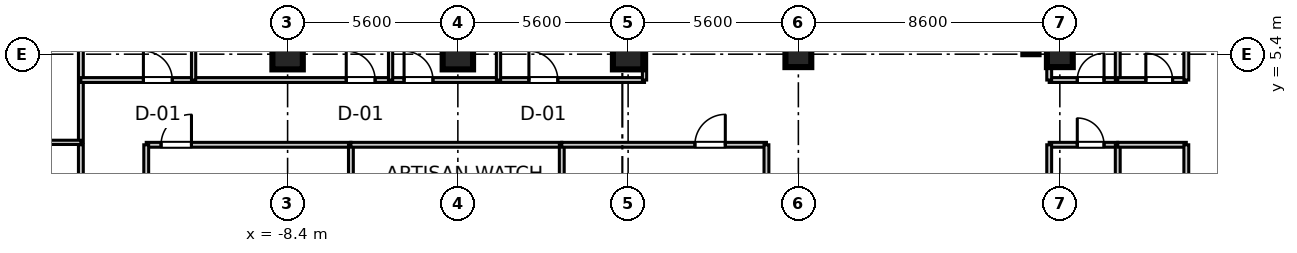
"""IFC4 building model, lengths in metres.
Left out: names, types, materials, properties, quantities, classifications, styles, units other than length and angle.
Written with IfcOpenShell. Run it as: python <this file> out.ifc"""

import sys

from ifc_helpers import new_model, si_unit, direction, frame, frame_2d, origin, origin_2d, place, context, subcontext, project, spatial, rectangle, extrude, source, transform, mapped, element, fill, save


model = new_model("IFC4")
c1 = context("Model", 3, precision=1e-05, world=origin(), true_north=direction((0.0, 1.0)))
c2 = subcontext(c1, "Body", "Model", "MODEL_VIEW")
j1 = project(units=[si_unit("LENGTHUNIT", "METRE"), si_unit("PLANEANGLEUNIT", "RADIAN")], contexts=[c1])
p1 = place(None, origin())
s1 = spatial("IfcSite", under=j1, at=p1, CompositionType="ELEMENT")
p2 = place(p1, origin())
s2 = spatial("IfcBuilding", under=s1, at=p2, CompositionType="ELEMENT")
p3 = place(p2, frame((0.0, 0.0, 204.9)))
s3 = spatial("IfcBuildingStorey", under=s2, at=p3, CompositionType="ELEMENT", Elevation=204.9)
m1 = source(origin(), c2, "Body", "SweptSolid", [
    extrude(rectangle(XDim=1.0, YDim=1.0, at=origin_2d()), origin(), (0.0, 0.0, 1.0), 3.655),
])
for number, where, z_axis, x_axis in (
    (1, (-8.4, 5.4, 0.0), (0.0, 0.0, 1.0), (1.0, 0.0, 0.0)),
    (2, (-2.8, 5.4, 0.0), (0.0, 0.0, 1.0), (1.0, 0.0, 0.0)),
    (3, (2.8, 5.4, 0.0), (0.0, 0.0, 1.0), (1.0, 0.0, 0.0)),
):
    element("IfcColumn", number, at=place(p3, frame(where, z_axis=z_axis, x_axis=x_axis)), inside=s3, PredefinedType="COLUMN", context=c2, shape_type="MappedRepresentation", body=[
        mapped(m1, transform((0.0, 0.0, 0.0), scale=1.0)),
    ])
m2 = source(origin(), c2, "Body", "SweptSolid", [
    extrude(rectangle(XDim=0.85, YDim=0.85, at=origin_2d()), origin(), (0.0, 0.0, 1.0), 3.655),
])
for number, where, z_axis, x_axis in (
    (4, (8.4, 5.4, 0.0), (0.0, 0.0, 1.0), (1.0, 0.0, 0.0)),
    (5, (17.0, 5.4, 0.0), (0.0, 0.0, 1.0), (1.0, 0.0, 0.0)),
):
    element("IfcColumn", number, at=place(p3, frame(where, z_axis=z_axis, x_axis=x_axis)), inside=s3, PredefinedType="PILASTER", context=c2, shape_type="MappedRepresentation", body=[
        mapped(m2, transform((0.0, 0.0, 0.0), scale=1.0)),
    ])
m3 = source(origin(), c2, "Body", "SweptSolid", [
    extrude(rectangle(XDim=11.6, YDim=0.5, at=frame_2d((5.8, 0.0))), origin(), (0.0, 0.0, 1.0), 3.41),
])
p4 = place(p3, frame((16.05, 5.4, 0.0), z_axis=(0.0, 0.0, 1.0), x_axis=(0.0, 1.0, 0.0)))
e6 = element("IfcWall", 6, at=p4, inside=s3, PredefinedType="SHEAR", context=c2, shape_type="MappedRepresentation", body=[
    mapped(m3, transform((0.0, 0.0, 0.0), scale=1.0)),
])
m4 = source(origin(), c2, "Body", "SweptSolid", [
    extrude(rectangle(XDim=2.255, YDim=0.16, at=frame_2d((1.127, 0.0))), origin(), (0.0, 0.0, 1.0), 2.75),
])
p5 = place(p3, frame((16.65, 4.55, 0.0), z_axis=(0.0, 0.0, 1.0), x_axis=(1.0, 0.0, 0.0)))
e7 = element("IfcWall", 7, at=p5, inside=s3, PredefinedType="PARTITIONING", context=c2, shape_type="MappedRepresentation", body=[
    mapped(m4, transform((0.0, 0.0, 0.0), scale=1.0)),
])
p6 = place(p5, frame((0.924, 0.0, 0.0)))
e8 = element("IfcOpeningElement", 8, at=p6, cuts=e7, PredefinedType="OPENING", context=c2, shape_type="SweptSolid", body=[
    extrude(rectangle(XDim=0.88, YDim=2.1, at=frame_2d((0.44, 1.05))), frame((0.0, 0.09, 0.0), z_axis=(0.0, -1.0, 0.0), x_axis=(1.0, 0.0, 0.0)), (0.0, 0.0, 1.0), 0.18),
])
m5 = source(origin(), c2, "Body", "SweptSolid", [
    extrude(rectangle(XDim=19.35, YDim=0.16, at=frame_2d((9.675, 0.0))), origin(), (0.0, 0.0, 1.0), 2.75),
])
for number, where, z_axis, x_axis in (
    (9, (16.65, 4.55, 0.0), (0.0, 0.0, 1.0), (0.0, 1.0, 0.0)),
    (10, (18.905, 4.55, 0.0), (0.0, 0.0, 1.0), (0.0, 1.0, 0.0)),
):
    element("IfcWall", number, at=place(p3, frame(where, z_axis=z_axis, x_axis=x_axis)), inside=s3, PredefinedType="PARTITIONING", context=c2, shape_type="MappedRepresentation", body=[
        mapped(m5, transform((0.0, 0.0, 0.0), scale=1.0)),
    ])
m6 = source(origin(), c2, "Body", "SweptSolid", [
    extrude(rectangle(XDim=2.255, YDim=0.16, at=frame_2d((1.127, 0.0))), origin(), (0.0, 0.0, 1.0), 2.75),
])
p7 = place(p3, frame((18.905, 4.55, 0.0), z_axis=(0.0, 0.0, 1.0), x_axis=(1.0, 0.0, 0.0)))
e11 = element("IfcWall", 11, at=p7, inside=s3, PredefinedType="PARTITIONING", context=c2, shape_type="MappedRepresentation", body=[
    mapped(m6, transform((0.0, 0.0, 0.0), scale=1.0)),
])
p8 = place(p7, frame((0.924, 0.0, 0.0)))
e12 = element("IfcOpeningElement", 12, at=p8, cuts=e11, PredefinedType="OPENING", context=c2, shape_type="SweptSolid", body=[
    extrude(rectangle(XDim=0.88, YDim=2.1, at=frame_2d((0.44, 1.05))), frame((0.0, 0.09, 0.0), z_axis=(0.0, -1.0, 0.0), x_axis=(1.0, 0.0, 0.0)), (0.0, 0.0, 1.0), 0.18),
])
m7 = source(origin(), c2, "Body", "SweptSolid", [
    extrude(rectangle(XDim=17.93, YDim=0.16, at=frame_2d((8.965, 0.0))), origin(), (0.0, 0.0, 1.0), 2.75),
])
p9 = place(p3, frame((21.16, 4.55, 0.0), z_axis=(0.0, 0.0, 1.0), x_axis=(0.0, 1.0, 0.0)))
e13 = element("IfcWall", 13, at=p9, inside=s3, PredefinedType="PARTITIONING", context=c2, shape_type="MappedRepresentation", body=[
    mapped(m7, transform((0.0, 0.0, 0.0), scale=1.0)),
])
m8 = source(origin(), c2, "Body", "SweptSolid", [
    extrude(rectangle(XDim=21.4, YDim=0.16, at=frame_2d((10.7, 0.0))), origin(), (0.0, 0.0, 1.0), 2.75),
])
p10 = place(p3, frame((-15.2, 2.5, 0.0), z_axis=(0.0, 0.0, 1.0), x_axis=(0.0, 1.0, 0.0)))
e14 = element("IfcWall", 14, at=p10, inside=s3, PredefinedType="PARTITIONING", context=c2, shape_type="MappedRepresentation", body=[
    mapped(m8, transform((0.0, 0.0, 0.0), scale=1.0)),
])
p11 = place(p10, frame((8.15, 0.0, 0.0)))
e15 = element("IfcOpeningElement", 15, at=p11, cuts=e14, PredefinedType="OPENING", context=c2, shape_type="SweptSolid", body=[
    extrude(rectangle(XDim=0.95, YDim=2.1, at=frame_2d((0.475, 1.05))), frame((0.0, 0.09, 0.0), z_axis=(0.0, -1.0, 0.0), x_axis=(1.0, 0.0, 0.0)), (0.0, 0.0, 1.0), 0.18),
])
m9 = source(origin(), c2, "Body", "SweptSolid", [
    extrude(rectangle(XDim=5.96, YDim=0.14, at=frame_2d((2.98, 0.0))), origin(), (0.0, 0.0, 1.0), 2.75),
])
p12 = place(p3, frame((-21.16, 2.5, 0.0), z_axis=(0.0, 0.0, 1.0), x_axis=(1.0, 0.0, 0.0)))
e16 = element("IfcWall", 16, at=p12, inside=s3, PredefinedType="PARTITIONING", context=c2, shape_type="MappedRepresentation", body=[
    mapped(m9, transform((0.0, 0.0, 0.0), scale=1.0)),
])
m10 = source(origin(), c2, "Body", "SweptSolid", [
    extrude(rectangle(XDim=18.54, YDim=0.16, at=frame_2d((9.27, 0.0))), origin(), (0.0, 0.0, 1.0), 2.75),
])
p13 = place(p3, frame((-15.2, 4.55, 0.0), z_axis=(0.0, 0.0, 1.0), x_axis=(1.0, 0.0, 0.0)))
e17 = element("IfcWall", 17, at=p13, inside=s3, PredefinedType="PARTITIONING", context=c2, shape_type="MappedRepresentation", body=[
    mapped(m10, transform((0.0, 0.0, 0.0), scale=1.0)),
])
p14 = place(p13, frame((2.057, 0.0, 0.0)))
e18 = element("IfcOpeningElement", 18, at=p14, cuts=e17, PredefinedType="OPENING", context=c2, shape_type="SweptSolid", body=[
    extrude(rectangle(XDim=0.95, YDim=2.1, at=frame_2d((0.475, 1.05))), frame((0.0, 0.09, 0.0), z_axis=(0.0, -1.0, 0.0), x_axis=(1.0, 0.0, 0.0)), (0.0, 0.0, 1.0), 0.18),
])
p15 = place(p13, frame((8.729, 0.0, 0.0)))
e19 = element("IfcOpeningElement", 19, at=p15, cuts=e17, PredefinedType="OPENING", context=c2, shape_type="SweptSolid", body=[
    extrude(rectangle(XDim=0.95, YDim=2.1, at=frame_2d((0.475, 1.05))), frame((0.0, 0.09, 0.0), z_axis=(0.0, -1.0, 0.0), x_axis=(1.0, 0.0, 0.0)), (0.0, 0.0, 1.0), 0.18),
])
p16 = place(p13, frame((10.631, 0.0, 0.0)))
e20 = element("IfcOpeningElement", 20, at=p16, cuts=e17, PredefinedType="OPENING", context=c2, shape_type="SweptSolid", body=[
    extrude(rectangle(XDim=0.95, YDim=2.1, at=frame_2d((0.475, 1.05))), frame((0.0, 0.09, 0.0), z_axis=(0.0, -1.0, 0.0), x_axis=(1.0, 0.0, 0.0)), (0.0, 0.0, 1.0), 0.18),
])
p17 = place(p13, frame((14.737, 0.0, 0.0)))
e21 = element("IfcOpeningElement", 21, at=p17, cuts=e17, PredefinedType="OPENING", context=c2, shape_type="SweptSolid", body=[
    extrude(rectangle(XDim=0.95, YDim=2.1, at=frame_2d((0.475, 1.05))), frame((0.0, 0.09, 0.0), z_axis=(0.0, -1.0, 0.0), x_axis=(1.0, 0.0, 0.0)), (0.0, 0.0, 1.0), 0.18),
])
m11 = source(origin(), c2, "Body", "SweptSolid", [
    extrude(rectangle(XDim=19.35, YDim=0.14, at=frame_2d((9.675, 0.0))), origin(), (0.0, 0.0, 1.0), 2.75),
])
for number, where, z_axis, x_axis in (
    (22, (3.34, 4.55, 0.0), (0.0, 0.0, 1.0), (0.0, 1.0, 0.0)),
    (23, (-11.492, 4.55, 0.0), (0.0, 0.0, 1.0), (0.0, 1.0, 0.0)),
    (24, (-5.013, 4.55, 0.0), (0.0, 0.0, 1.0), (0.0, 1.0, 0.0)),
    (25, (-1.463, 4.55, 0.0), (0.0, 0.0, 1.0), (0.0, 1.0, 0.0)),
):
    element("IfcWall", number, at=place(p3, frame(where, z_axis=z_axis, x_axis=x_axis)), inside=s3, PredefinedType="PARTITIONING", context=c2, shape_type="MappedRepresentation", body=[
        mapped(m11, transform((0.0, 0.0, 0.0), scale=1.0)),
    ])
m12 = source(origin(), c2, "Body", "SweptSolid", [
    extrude(rectangle(XDim=4.84, YDim=0.16, at=frame_2d((2.42, 0.0))), origin(), (0.0, 0.0, 1.0), 2.75),
])
p18 = place(p3, frame((-15.2, -2.42, 0.0), z_axis=(0.0, 0.0, 1.0), x_axis=(0.0, 1.0, 0.0)))
e26 = element("IfcWall", 26, at=p18, inside=s3, PredefinedType="PARTITIONING", context=c2, shape_type="MappedRepresentation", body=[
    mapped(m12, transform((0.0, 0.0, 0.0), scale=1.0)),
])
p19 = place(p18, frame((1.945, 0.0, 0.0)))
e27 = element("IfcOpeningElement", 27, at=p19, cuts=e26, PredefinedType="OPENING", context=c2, shape_type="SweptSolid", body=[
    extrude(rectangle(XDim=0.95, YDim=2.1, at=frame_2d((0.475, 1.05))), frame((0.0, 0.09, 0.0), z_axis=(0.0, -1.0, 0.0), x_axis=(1.0, 0.0, 0.0)), (0.0, 0.0, 1.0), 0.18),
])
m13 = source(origin(), c2, "Body", "SweptSolid", [
    extrude(rectangle(XDim=6.732, YDim=0.16, at=frame_2d((3.366, 0.0))), origin(), (0.0, 0.0, 1.0), 2.75),
])
p20 = place(p3, frame((-13.05, 2.42, 0.0), z_axis=(0.0, 0.0, 1.0), x_axis=(1.0, 0.0, 0.0)))
e28 = element("IfcWall", 28, at=p20, inside=s3, PredefinedType="PARTITIONING", context=c2, shape_type="MappedRepresentation", body=[
    mapped(m13, transform((0.0, 0.0, 0.0), scale=1.0)),
])
p21 = place(p20, frame((0.488, 0.0, 0.0)))
e29 = element("IfcOpeningElement", 29, at=p21, cuts=e28, PredefinedType="OPENING", context=c2, shape_type="SweptSolid", body=[
    extrude(rectangle(XDim=1.0, YDim=2.1, at=frame_2d((0.5, 1.05))), frame((0.0, 0.09, 0.0), z_axis=(0.0, -1.0, 0.0), x_axis=(1.0, 0.0, 0.0)), (0.0, 0.0, 1.0), 0.18),
])
for number, where, z_axis, x_axis in (
    (30, (-13.05, -2.42, 0.0), (0.0, 0.0, 1.0), (0.0, 1.0, 0.0)),
    (31, (-6.318, -2.42, 0.0), (0.0, 0.0, 1.0), (0.0, 1.0, 0.0)),
):
    element("IfcWall", number, at=place(p3, frame(where, z_axis=z_axis, x_axis=x_axis)), inside=s3, PredefinedType="PARTITIONING", context=c2, shape_type="MappedRepresentation", body=[
        mapped(m12, transform((0.0, 0.0, 0.0), scale=1.0)),
    ])
m14 = source(origin(), c2, "Body", "SweptSolid", [
    extrude(rectangle(XDim=6.936, YDim=0.16, at=frame_2d((3.468, 0.0))), origin(), (0.0, 0.0, 1.0), 2.75),
])
p22 = place(p3, frame((-6.318, 2.42, 0.0), z_axis=(0.0, 0.0, 1.0), x_axis=(1.0, 0.0, 0.0)))
e32 = element("IfcWall", 32, at=p22, inside=s3, PredefinedType="PARTITIONING", context=c2, shape_type="MappedRepresentation", body=[
    mapped(m14, transform((0.0, 0.0, 0.0), scale=1.0)),
])
p23 = place(p3, frame((0.618, -2.42, 0.0), z_axis=(0.0, 0.0, 1.0), x_axis=(0.0, 1.0, 0.0)))
e33 = element("IfcWall", 33, at=p23, inside=s3, PredefinedType="PARTITIONING", context=c2, shape_type="MappedRepresentation", body=[
    mapped(m12, transform((0.0, 0.0, 0.0), scale=1.0)),
])
m15 = source(origin(), c2, "Body", "SweptSolid", [
    extrude(rectangle(XDim=6.732, YDim=0.16, at=frame_2d((3.366, 0.0))), origin(), (0.0, 0.0, 1.0), 2.75),
])
p24 = place(p3, frame((0.618, 2.42, 0.0), z_axis=(0.0, 0.0, 1.0), x_axis=(1.0, 0.0, 0.0)))
e34 = element("IfcWall", 34, at=p24, inside=s3, PredefinedType="PARTITIONING", context=c2, shape_type="MappedRepresentation", body=[
    mapped(m15, transform((0.0, 0.0, 0.0), scale=1.0)),
])
p25 = place(p24, frame((4.379, 0.0, 0.0)))
e35 = element("IfcOpeningElement", 35, at=p25, cuts=e34, PredefinedType="OPENING", context=c2, shape_type="SweptSolid", body=[
    extrude(rectangle(XDim=1.0, YDim=2.1, at=frame_2d((0.5, 1.05))), frame((0.0, 0.09, 0.0), z_axis=(0.0, -1.0, 0.0), x_axis=(1.0, 0.0, 0.0)), (0.0, 0.0, 1.0), 0.18),
])
p26 = place(p3, frame((7.35, -2.42, 0.0), z_axis=(0.0, 0.0, 1.0), x_axis=(0.0, 1.0, 0.0)))
e36 = element("IfcWall", 36, at=p26, inside=s3, PredefinedType="PARTITIONING", context=c2, shape_type="MappedRepresentation", body=[
    mapped(m12, transform((0.0, 0.0, 0.0), scale=1.0)),
])
p27 = place(p3, frame((16.65, 2.42, 0.0), z_axis=(0.0, 0.0, 1.0), x_axis=(1.0, 0.0, 0.0)))
e37 = element("IfcWall", 37, at=p27, inside=s3, PredefinedType="PARTITIONING", context=c2, shape_type="MappedRepresentation", body=[
    mapped(m4, transform((0.0, 0.0, 0.0), scale=1.0)),
])
p28 = place(p27, frame((0.924, 0.0, 0.0)))
e38 = element("IfcOpeningElement", 38, at=p28, cuts=e37, PredefinedType="OPENING", context=c2, shape_type="SweptSolid", body=[
    extrude(rectangle(XDim=0.88, YDim=2.1, at=frame_2d((0.44, 1.05))), frame((0.0, 0.09, 0.0), z_axis=(0.0, -1.0, 0.0), x_axis=(1.0, 0.0, 0.0)), (0.0, 0.0, 1.0), 0.18),
])
for number, where, z_axis, x_axis in (
    (39, (16.65, -2.42, 0.0), (0.0, 0.0, 1.0), (0.0, 1.0, 0.0)),
    (40, (18.905, -2.42, 0.0), (0.0, 0.0, 1.0), (0.0, 1.0, 0.0)),
):
    element("IfcWall", number, at=place(p3, frame(where, z_axis=z_axis, x_axis=x_axis)), inside=s3, PredefinedType="PARTITIONING", context=c2, shape_type="MappedRepresentation", body=[
        mapped(m12, transform((0.0, 0.0, 0.0), scale=1.0)),
    ])
p29 = place(p3, frame((18.905, 2.42, 0.0), z_axis=(0.0, 0.0, 1.0), x_axis=(1.0, 0.0, 0.0)))
e41 = element("IfcWall", 41, at=p29, inside=s3, PredefinedType="PARTITIONING", context=c2, shape_type="MappedRepresentation", body=[
    mapped(m6, transform((0.0, 0.0, 0.0), scale=1.0)),
])
p30 = place(p3, frame((21.16, -2.42, 0.0), z_axis=(0.0, 0.0, 1.0), x_axis=(0.0, 1.0, 0.0)))
e42 = element("IfcWall", 42, at=p30, inside=s3, PredefinedType="PARTITIONING", context=c2, shape_type="MappedRepresentation", body=[
    mapped(m12, transform((0.0, 0.0, 0.0), scale=1.0)),
])
m16 = source(origin(), c2, "Body", "SweptSolid", [
    extrude(rectangle(XDim=0.88, YDim=2.1, at=frame_2d((0.44, 1.05))), frame((0.0, 0.025, 0.0), z_axis=(0.0, -1.0, 0.0), x_axis=(1.0, 0.0, 0.0)), (0.0, 0.0, 1.0), 0.05),
])
p31 = place(p6, origin())
e43 = element("IfcDoor", 43, at=p31, inside=s3, OperationType="SINGLE_SWING_RIGHT", PredefinedType="DOOR", context=c2, shape_type="MappedRepresentation", body=[
    mapped(m16, transform((0.0, 0.0, 0.0), scale=1.0)),
])
fill(e8, e43)
p32 = place(p8, origin())
e44 = element("IfcDoor", 44, at=p32, inside=s3, OperationType="SINGLE_SWING_LEFT", PredefinedType="DOOR", context=c2, shape_type="MappedRepresentation", body=[
    mapped(m16, transform((0.0, 0.0, 0.0), scale=1.0)),
])
fill(e12, e44)
m17 = source(origin(), c2, "Body", "SweptSolid", [
    extrude(rectangle(XDim=0.95, YDim=2.1, at=frame_2d((0.475, 1.05))), frame((0.0, 0.025, 0.0), z_axis=(0.0, -1.0, 0.0), x_axis=(1.0, 0.0, 0.0)), (0.0, 0.0, 1.0), 0.05),
])
p33 = place(p14, origin())
e45 = element("IfcDoor", 45, at=p33, inside=s3, OperationType="SINGLE_SWING_LEFT", PredefinedType="DOOR", context=c2, shape_type="MappedRepresentation", body=[
    mapped(m17, transform((0.0, 0.0, 0.0), scale=1.0)),
])
fill(e18, e45)
p34 = place(p15, origin())
e46 = element("IfcDoor", 46, at=p34, inside=s3, OperationType="SINGLE_SWING_LEFT", PredefinedType="DOOR", context=c2, shape_type="MappedRepresentation", body=[
    mapped(m17, transform((0.0, 0.0, 0.0), scale=1.0)),
])
fill(e19, e46)
p35 = place(p16, origin())
e47 = element("IfcDoor", 47, at=p35, inside=s3, OperationType="SINGLE_SWING_LEFT", PredefinedType="DOOR", context=c2, shape_type="MappedRepresentation", body=[
    mapped(m17, transform((0.0, 0.0, 0.0), scale=1.0)),
])
fill(e20, e47)
p36 = place(p17, origin())
e48 = element("IfcDoor", 48, at=p36, inside=s3, OperationType="SINGLE_SWING_LEFT", PredefinedType="DOOR", context=c2, shape_type="MappedRepresentation", body=[
    mapped(m17, transform((0.0, 0.0, 0.0), scale=1.0)),
])
fill(e21, e48)
m18 = source(origin(), c2, "Body", "SweptSolid", [
    extrude(rectangle(XDim=1.0, YDim=2.1, at=frame_2d((0.5, 1.05))), frame((0.0, 0.025, 0.0), z_axis=(0.0, -1.0, 0.0), x_axis=(1.0, 0.0, 0.0)), (0.0, 0.0, 1.0), 0.05),
])
p37 = place(p21, frame((1.0, 0.0, 0.0), z_axis=(0.0, 0.0, 1.0), x_axis=(-1.0, 0.0, 0.0)))
e49 = element("IfcDoor", 49, at=p37, inside=s3, OperationType="SINGLE_SWING_RIGHT", PredefinedType="DOOR", context=c2, shape_type="MappedRepresentation", body=[
    mapped(m18, transform((0.0, 0.0, 0.0), scale=1.0)),
])
fill(e29, e49)
p38 = place(p25, frame((1.0, 0.0, 0.0), z_axis=(0.0, 0.0, 1.0), x_axis=(-1.0, 0.0, 0.0)))
e50 = element("IfcDoor", 50, at=p38, inside=s3, OperationType="SINGLE_SWING_RIGHT", PredefinedType="DOOR", context=c2, shape_type="MappedRepresentation", body=[
    mapped(m18, transform((0.0, 0.0, 0.0), scale=1.0)),
])
fill(e35, e50)
p39 = place(p28, frame((0.88, 0.0, 0.0), z_axis=(0.0, 0.0, 1.0), x_axis=(-1.0, 0.0, 0.0)))
e51 = element("IfcDoor", 51, at=p39, inside=s3, OperationType="SINGLE_SWING_LEFT", PredefinedType="DOOR", context=c2, shape_type="MappedRepresentation", body=[
    mapped(m16, transform((0.0, 0.0, 0.0), scale=1.0)),
])
fill(e38, e51)
save(model, sys.argv[1])
